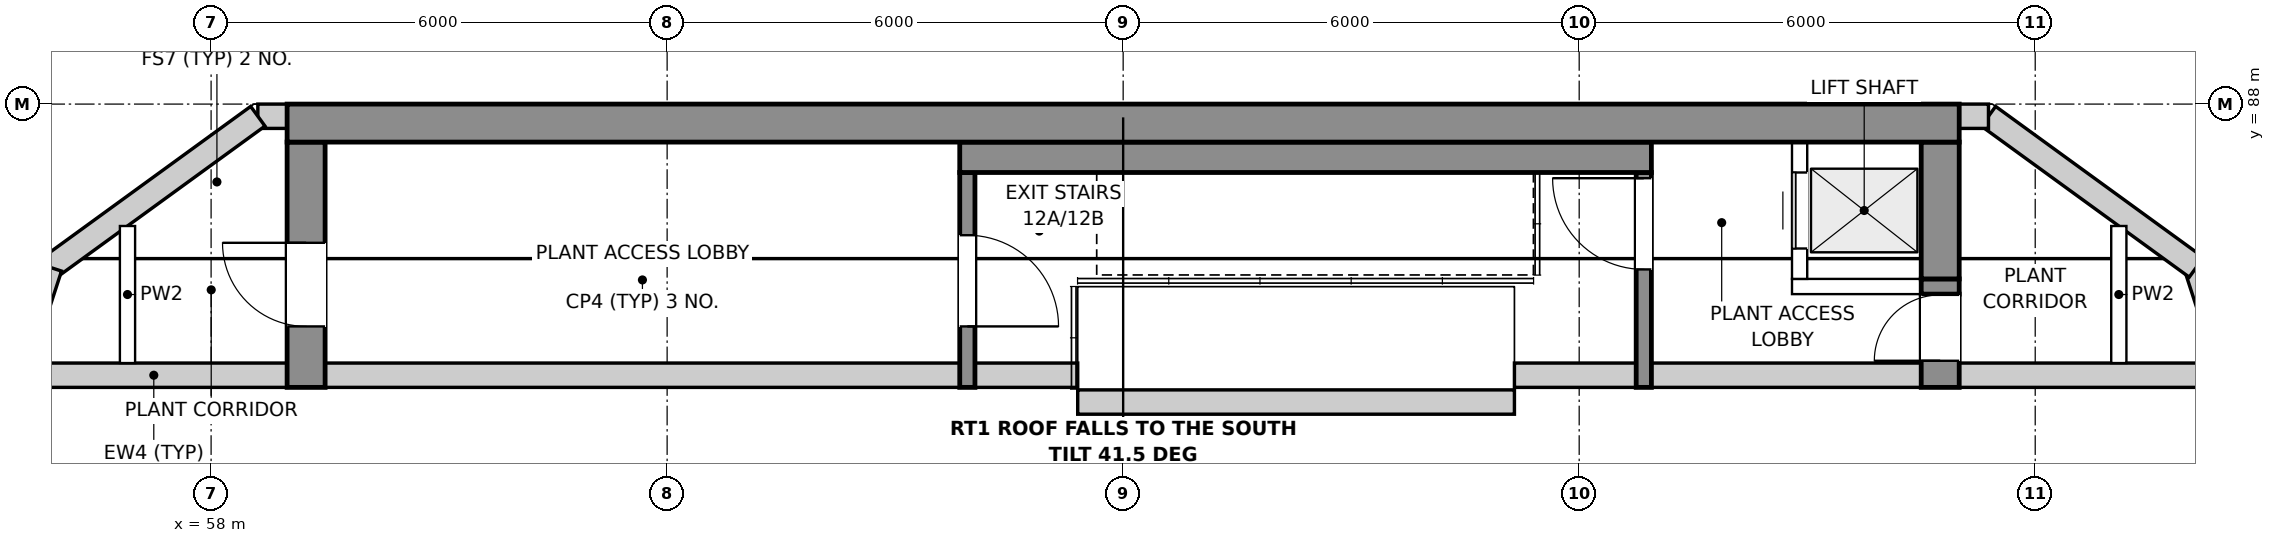
"""IFC4 building model, lengths in metres.
Left out: names, types, materials, properties, quantities, classifications, styles, units other than length and angle.
Written with IfcOpenShell. Run it as: python <this file> out.ifc"""

import sys

from ifc_helpers import new_model, si_unit, direction, frame, frame_2d, origin, place, context, subcontext, project, spatial, polyline, rectangle, outline, extrude, element, fill, save


model = new_model("IFC4")
c1 = context("Model", 3, precision=1e-05, world=origin(), true_north=direction((0.0, 1.0)))
c2 = subcontext(c1, "Body", "Model", "MODEL_VIEW")
j1 = project(units=[si_unit("LENGTHUNIT", "METRE"), si_unit("PLANEANGLEUNIT", "RADIAN")], contexts=[c1])
p1 = place(None, origin())
s1 = spatial("IfcSite", under=j1, at=p1, CompositionType="ELEMENT")
p2 = place(p1, origin())
s2 = spatial("IfcBuilding", under=s1, at=p2, CompositionType="ELEMENT")
p3 = place(p2, frame((0.0, 0.0, 355.7)))
s3 = spatial("IfcBuildingStorey", under=s2, at=p3, CompositionType="ELEMENT", Elevation=355.7)
p4 = place(p3, frame((84.65, 84.224, 0.0), z_axis=(0.0, 0.0, 1.0), x_axis=(-0.309034501563, 0.951050827687, 0.0)))
e1 = element("IfcWall", 1, at=p4, inside=s3, PredefinedType="SOLIDWALL", context=c2, shape_type="SweptSolid", body=[
    extrude(outline(polyline([(0.0, 0.0), (1.713, 0.0), (1.713, 4.099), (0.0, 2.656), (0.0, 0.0)])), frame((0.0, 0.16, 0.0), z_axis=(0.0, -1.0, 0.0), x_axis=(1.0, 0.0, 0.0)), (0.0, 0.0, 1.0), 0.32),
])
p5 = place(p3, frame((84.12, 85.853, 0.0), z_axis=(0.0, 0.0, 1.0), x_axis=(-0.808988923467, 0.587823886643, 0.0)))
e2 = element("IfcWall", 2, at=p5, inside=s3, PredefinedType="SOLIDWALL", context=c2, shape_type="SweptSolid", body=[
    extrude(outline(polyline([(0.0, 0.0), (3.381, 0.0), (3.381, 4.2), (0.195, 4.2), (0.0, 4.099), (0.0, 0.0)])), frame((0.0, 0.16, 0.0), z_axis=(0.0, -1.0, 0.0), x_axis=(1.0, 0.0, 0.0)), (0.0, 0.0, 1.0), 0.32),
])
for number, where, z_axis, x_axis in (
    (3, (81.385, 87.84, 0.0), (0.0, 0.0, 1.0), (-1.0, 0.0, 0.0)),
    (4, (59.0, 87.84, 0.0), (0.0, 0.0, 1.0), (-1.0, 0.0, 0.0)),
):
    element("IfcWall", number, at=place(p3, frame(where, z_axis=z_axis, x_axis=x_axis)), inside=s3, PredefinedType="SOLIDWALL", context=c2, shape_type="SweptSolid", body=[
        extrude(rectangle(XDim=0.385, YDim=0.32, at=frame_2d((0.192, 0.0))), origin(), (0.0, 0.0, 1.0), 4.2),
    ])
p6 = place(p3, frame((58.615, 87.84, 0.0), z_axis=(0.0, 0.0, 1.0), x_axis=(-0.808988923467, -0.587823886643, 0.0)))
e5 = element("IfcWall", 5, at=p6, inside=s3, PredefinedType="SOLIDWALL", context=c2, shape_type="SweptSolid", body=[
    extrude(outline(polyline([(0.0, 0.0), (3.381, 0.0), (3.381, 4.099), (3.186, 4.2), (0.0, 4.2), (0.0, 0.0)])), frame((0.0, 0.16, 0.0), z_axis=(0.0, -1.0, 0.0), x_axis=(1.0, 0.0, 0.0)), (0.0, 0.0, 1.0), 0.32),
])
p7 = place(p3, frame((55.88, 85.853, 0.0), z_axis=(0.0, 0.0, 1.0), x_axis=(-0.309034501563, -0.951050827687, 0.0)))
e6 = element("IfcWall", 6, at=p7, inside=s3, PredefinedType="SOLIDWALL", context=c2, shape_type="SweptSolid", body=[
    extrude(outline(polyline([(0.0, 0.0), (1.713, 0.0), (1.713, 2.656), (0.0, 4.099), (0.0, 0.0)])), frame((0.0, 0.16, 0.0), z_axis=(0.0, -1.0, 0.0), x_axis=(1.0, 0.0, 0.0)), (0.0, 0.0, 1.0), 0.32),
])
p8 = place(p3, frame((55.492, 84.433, 0.0), z_axis=(0.0, 0.0, 1.0), x_axis=(1.0, 0.0, 0.0)))
e7 = element("IfcWall", 7, at=p8, inside=s3, PredefinedType="SOLIDWALL", context=c2, shape_type="SweptSolid", body=[
    extrude(rectangle(XDim=3.508, YDim=0.32, at=frame_2d((1.754, 0.0))), origin(), (0.0, 0.0, 1.0), 2.842),
])
p9 = place(p3, frame((59.5, 84.433, 0.0), z_axis=(0.0, 0.0, 1.0), x_axis=(1.0, 0.0, 0.0)))
e8 = element("IfcWall", 8, at=p9, inside=s3, PredefinedType="SOLIDWALL", context=c2, shape_type="SweptSolid", body=[
    extrude(rectangle(XDim=8.35, YDim=0.32, at=frame_2d((4.175, 0.0))), origin(), (0.0, 0.0, 1.0), 2.842),
])
p10 = place(p3, frame((68.05, 84.433, 0.0), z_axis=(0.0, 0.0, 1.0), x_axis=(1.0, 0.0, 0.0)))
e9 = element("IfcWall", 9, at=p10, inside=s3, PredefinedType="SOLIDWALL", context=c2, shape_type="SweptSolid", body=[
    extrude(rectangle(XDim=1.352, YDim=0.32, at=frame_2d((0.676, 0.0))), origin(), (0.0, 0.0, 1.0), 2.842),
])
p11 = place(p3, frame((75.148, 84.433, 0.0), z_axis=(0.0, 0.0, 1.0), x_axis=(1.0, 0.0, 0.0)))
e10 = element("IfcWall", 10, at=p11, inside=s3, PredefinedType="SOLIDWALL", context=c2, shape_type="SweptSolid", body=[
    extrude(rectangle(XDim=1.602, YDim=0.32, at=frame_2d((0.801, 0.0))), origin(), (0.0, 0.0, 1.0), 2.842),
])
p12 = place(p3, frame((76.95, 84.433, 0.0), z_axis=(0.0, 0.0, 1.0), x_axis=(1.0, 0.0, 0.0)))
e11 = element("IfcWall", 11, at=p12, inside=s3, PredefinedType="SOLIDWALL", context=c2, shape_type="SweptSolid", body=[
    extrude(rectangle(XDim=3.55, YDim=0.32, at=frame_2d((1.775, 0.0))), origin(), (0.0, 0.0, 1.0), 2.842),
])
p13 = place(p3, frame((81.0, 84.433, 0.0), z_axis=(0.0, 0.0, 1.0), x_axis=(1.0, 0.0, 0.0)))
e12 = element("IfcWall", 12, at=p13, inside=s3, PredefinedType="SOLIDWALL", context=c2, shape_type="SweptSolid", body=[
    extrude(rectangle(XDim=3.508, YDim=0.32, at=frame_2d((1.754, 0.0))), origin(), (0.0, 0.0, 1.0), 2.842),
])
p14 = place(p3, frame((69.402, 84.08, 0.0), z_axis=(0.0, 0.0, 1.0), x_axis=(1.0, 0.0, 0.0)))
e13 = element("IfcWall", 13, at=p14, inside=s3, PredefinedType="SOLIDWALL", context=c2, shape_type="SweptSolid", body=[
    extrude(rectangle(XDim=5.746, YDim=0.32, at=frame_2d((2.873, 0.0))), origin(), (0.0, 0.0, 1.0), 2.529),
])
p15 = place(p3, frame((59.25, 84.273, 0.0), z_axis=(0.0, 0.0, 1.0), x_axis=(0.0, 1.0, 0.0)))
e14 = element("IfcWall", 14, at=p15, inside=s3, PredefinedType="SHEAR", context=c2, shape_type="SweptSolid", body=[
    extrude(outline(polyline([(0.0, 0.0), (3.227, 0.0), (3.227, 4.5), (0.0, 2.65), (0.0, 0.0)])), frame((0.0, 0.25, 0.0), z_axis=(0.0, -1.0, 0.0), x_axis=(1.0, 0.0, 0.0)), (0.0, 0.0, 1.0), 0.5),
])
p16 = place(p15, frame((0.802, 0.0, 0.0)))
e15 = element("IfcOpeningElement", 15, at=p16, cuts=e14, PredefinedType="OPENING", context=c2, shape_type="SweptSolid", body=[
    extrude(rectangle(XDim=1.1, YDim=2.1, at=frame_2d((0.55, 1.05))), frame((0.0, 0.26, 0.0), z_axis=(0.0, -1.0, 0.0), x_axis=(1.0, 0.0, 0.0)), (0.0, 0.0, 1.0), 0.52),
])
p17 = place(p3, frame((67.95, 84.273, 0.0), z_axis=(0.0, 0.0, 1.0), x_axis=(0.0, 1.0, 0.0)))
e16 = element("IfcWall", 16, at=p17, inside=s3, PredefinedType="SHEAR", context=c2, shape_type="SweptSolid", body=[
    extrude(outline(polyline([(0.0, 0.0), (2.827, 0.0), (2.827, 4.5), (0.0, 2.65), (0.0, 0.0)])), frame((0.0, 0.1, 0.0), z_axis=(0.0, -1.0, 0.0), x_axis=(1.0, 0.0, 0.0)), (0.0, 0.0, 1.0), 0.2),
])
p18 = place(p17, frame((0.802, 0.0, 0.0)))
e17 = element("IfcOpeningElement", 17, at=p18, cuts=e16, PredefinedType="OPENING", context=c2, shape_type="SweptSolid", body=[
    extrude(rectangle(XDim=1.2, YDim=2.1, at=frame_2d((0.6, 1.05))), frame((0.0, 0.11, 0.0), z_axis=(0.0, -1.0, 0.0), x_axis=(1.0, 0.0, 0.0)), (0.0, 0.0, 1.0), 0.22),
])
p19 = place(p3, frame((76.85, 84.273, 0.0), z_axis=(0.0, 0.0, 1.0), x_axis=(0.0, 1.0, 0.0)))
e18 = element("IfcWall", 18, at=p19, inside=s3, PredefinedType="SHEAR", context=c2, shape_type="SweptSolid", body=[
    extrude(outline(polyline([(0.0, 0.0), (2.827, 0.0), (2.827, 4.5), (0.0, 2.65), (0.0, 0.0)])), frame((0.0, 0.1, 0.0), z_axis=(0.0, -1.0, 0.0), x_axis=(1.0, 0.0, 0.0)), (0.0, 0.0, 1.0), 0.2),
])
p20 = place(p19, frame((1.552, 0.0, 0.0)))
e19 = element("IfcOpeningElement", 19, at=p20, cuts=e18, PredefinedType="OPENING", context=c2, shape_type="SweptSolid", body=[
    extrude(rectangle(XDim=1.2, YDim=2.1, at=frame_2d((0.6, 1.05))), frame((0.0, 0.11, 0.0), z_axis=(0.0, -1.0, 0.0), x_axis=(1.0, 0.0, 0.0)), (0.0, 0.0, 1.0), 0.22),
])
p21 = place(p3, frame((80.75, 84.273, 0.0), z_axis=(0.0, 0.0, 1.0), x_axis=(0.0, 1.0, 0.0)))
e20 = element("IfcWall", 20, at=p21, inside=s3, PredefinedType="SHEAR", context=c2, shape_type="SweptSolid", body=[
    extrude(outline(polyline([(0.0, 0.0), (1.227, 0.0), (1.227, 3.736), (0.0, 2.65), (0.0, 0.0)])), frame((0.0, 0.25, 0.0), z_axis=(0.0, -1.0, 0.0), x_axis=(1.0, 0.0, 0.0)), (0.0, 0.0, 1.0), 0.5),
])
p22 = place(p21, frame((0.35, 0.0, 0.0)))
e21 = element("IfcOpeningElement", 21, at=p22, cuts=e20, PredefinedType="OPENING", context=c2, shape_type="SweptSolid", body=[
    extrude(rectangle(XDim=0.867, YDim=2.1, at=frame_2d((0.434, 1.05))), frame((0.0, 0.26, 0.0), z_axis=(0.0, -1.0, 0.0), x_axis=(1.0, 0.0, 0.0)), (0.0, 0.0, 1.0), 0.52),
])
p23 = place(p3, frame((78.8, 85.6, 0.0), z_axis=(0.0, 0.0, 1.0), x_axis=(1.0, 0.0, 0.0)))
e22 = element("IfcWall", 22, at=p23, inside=s3, PredefinedType="PARTITIONING", context=c2, shape_type="SweptSolid", body=[
    extrude(rectangle(XDim=1.7, YDim=0.2, at=frame_2d((0.85, 0.0))), origin(), (0.0, 0.0, 1.0), 3.725),
])
p24 = place(p3, frame((80.5, 85.6, 0.0), z_axis=(0.0, 0.0, 1.0), x_axis=(1.0, 0.0, 0.0)))
e23 = element("IfcWall", 23, at=p24, inside=s3, PredefinedType="SHEAR", context=c2, shape_type="SweptSolid", body=[
    extrude(rectangle(XDim=0.5, YDim=0.2, at=frame_2d((0.25, 0.0))), origin(), (0.0, 0.0, 1.0), 3.825),
])
p25 = place(p3, frame((78.9, 85.7, 0.0), z_axis=(0.0, 0.0, 1.0), x_axis=(0.0, 1.0, 0.0)))
e24 = element("IfcWall", 24, at=p25, inside=s3, PredefinedType="PARTITIONING", context=c2, shape_type="SweptSolid", body=[
    extrude(outline(polyline([(0.0, 0.0), (1.8, 0.0), (1.8, 4.2), (0.0, 3.813), (0.0, 0.0)])), frame((0.0, 0.1, 0.0), z_axis=(0.0, -1.0, 0.0), x_axis=(1.0, 0.0, 0.0)), (0.0, 0.0, 1.0), 0.2),
])
p26 = place(p25, frame((0.4, 0.0, 0.0)))
e25 = element("IfcOpeningElement", 25, at=p26, cuts=e24, PredefinedType="OPENING", context=c2, shape_type="SweptSolid", body=[
    extrude(rectangle(XDim=1.0, YDim=2.1, at=frame_2d((0.5, 1.05))), frame((0.0, 0.11, 0.0), z_axis=(0.0, -1.0, 0.0), x_axis=(1.0, 0.0, 0.0)), (0.0, 0.0, 1.0), 0.22),
])
p27 = place(p3, frame((80.75, 85.7, 0.0), z_axis=(0.0, 0.0, 1.0), x_axis=(0.0, 1.0, 0.0)))
e26 = element("IfcWall", 26, at=p27, inside=s3, PredefinedType="SHEAR", context=c2, shape_type="SweptSolid", body=[
    extrude(outline(polyline([(0.0, 0.0), (1.8, 0.0), (1.8, 4.5), (0.0, 3.914), (0.0, 0.0)])), frame((0.0, 0.25, 0.0), z_axis=(0.0, -1.0, 0.0), x_axis=(1.0, 0.0, 0.0)), (0.0, 0.0, 1.0), 0.5),
])
p28 = place(p3, frame((67.85, 87.3, 0.0), z_axis=(0.0, 0.0, 1.0), x_axis=(1.0, 0.0, 0.0)))
e27 = element("IfcWall", 27, at=p28, inside=s3, PredefinedType="SHEAR", context=c2, shape_type="SweptSolid", body=[
    extrude(rectangle(XDim=9.1, YDim=0.4, at=frame_2d((4.55, 0.0))), origin(), (0.0, 0.0, 1.0), 4.5),
])
p29 = place(p3, frame((59.0, 87.75, 0.0), z_axis=(0.0, 0.0, 1.0), x_axis=(1.0, 0.0, 0.0)))
e28 = element("IfcWall", 28, at=p29, inside=s3, PredefinedType="SHEAR", context=c2, shape_type="SweptSolid", body=[
    extrude(rectangle(XDim=22.0, YDim=0.5, at=frame_2d((11.0, 0.0))), origin(), (0.0, 0.0, 1.0), 4.5),
])
p30 = place(p3, frame((56.9, 84.593, 0.0), z_axis=(0.0, 0.0, 1.0), x_axis=(0.0, 1.0, 0.0)))
e29 = element("IfcWall", 29, at=p30, inside=s3, PredefinedType="PARTITIONING", context=c2, shape_type="SweptSolid", body=[
    extrude(outline(polyline([(0.0, 0.0), (1.803, 0.0), (1.803, 4.2), (0.0, 2.833), (0.0, 0.0)])), frame((0.0, 0.1, 0.0), z_axis=(0.0, -1.0, 0.0), x_axis=(1.0, 0.0, 0.0)), (0.0, 0.0, 1.0), 0.2),
])
p31 = place(p3, frame((83.1, 86.396, 0.0), z_axis=(0.0, 0.0, 1.0), x_axis=(0.0, -1.0, 0.0)))
e30 = element("IfcWall", 30, at=p31, inside=s3, PredefinedType="PARTITIONING", context=c2, shape_type="SweptSolid", body=[
    extrude(outline(polyline([(0.0, 0.0), (1.803, 0.0), (1.803, 2.833), (0.0, 4.2), (0.0, 0.0)])), frame((0.0, 0.1, 0.0), z_axis=(0.0, -1.0, 0.0), x_axis=(1.0, 0.0, 0.0)), (0.0, 0.0, 1.0), 0.2),
])
p32 = place(p18, frame((1.2, 0.0, 0.0), z_axis=(0.0, 0.0, 1.0), x_axis=(-1.0, 0.0, 0.0)))
e31 = element("IfcDoor", 31, at=p32, inside=s3, OperationType="SINGLE_SWING_RIGHT", PredefinedType="DOOR", context=c2, shape_type="SweptSolid", body=[
    extrude(rectangle(XDim=1.2, YDim=2.1, at=frame_2d((0.6, 1.05))), frame((0.0, 0.025, 0.0), z_axis=(0.0, -1.0, 0.0), x_axis=(1.0, 0.0, 0.0)), (0.0, 0.0, 1.0), 0.05),
])
fill(e17, e31)
p33 = place(p20, origin())
e32 = element("IfcDoor", 32, at=p33, inside=s3, OperationType="SINGLE_SWING_RIGHT", PredefinedType="DOOR", context=c2, shape_type="SweptSolid", body=[
    extrude(rectangle(XDim=1.2, YDim=2.1, at=frame_2d((0.6, 1.05))), frame((0.0, 0.025, 0.0), z_axis=(0.0, -1.0, 0.0), x_axis=(1.0, 0.0, 0.0)), (0.0, 0.0, 1.0), 0.05),
])
fill(e19, e32)
p34 = place(p16, origin())
e33 = element("IfcDoor", 33, at=p34, inside=s3, OperationType="SINGLE_SWING_RIGHT", PredefinedType="DOOR", context=c2, shape_type="SweptSolid", body=[
    extrude(rectangle(XDim=1.1, YDim=2.1, at=frame_2d((0.55, 1.05))), frame((0.0, 0.025, 0.0), z_axis=(0.0, -1.0, 0.0), x_axis=(1.0, 0.0, 0.0)), (0.0, 0.0, 1.0), 0.05),
])
fill(e15, e33)
p35 = place(p22, origin())
e34 = element("IfcDoor", 34, at=p35, inside=s3, OperationType="SINGLE_SWING_LEFT", PredefinedType="DOOR", context=c2, shape_type="SweptSolid", body=[
    extrude(rectangle(XDim=0.867, YDim=2.1, at=frame_2d((0.434, 1.05))), frame((0.0, 0.025, 0.0), z_axis=(0.0, -1.0, 0.0), x_axis=(1.0, 0.0, 0.0)), (0.0, 0.0, 1.0), 0.05),
])
fill(e21, e34)
p36 = place(p26, origin())
e35 = element("IfcDoor", 35, at=p36, inside=s3, OperationType="DOUBLE_DOOR_SLIDING", PredefinedType="DOOR", context=c2, shape_type="SweptSolid", body=[
    extrude(rectangle(XDim=1.0, YDim=2.1, at=frame_2d((0.5, 1.05))), frame((0.0, 0.025, 0.0), z_axis=(0.0, -1.0, 0.0), x_axis=(1.0, 0.0, 0.0)), (0.0, 0.0, 1.0), 0.05),
])
fill(e25, e35)
save(model, sys.argv[1])
